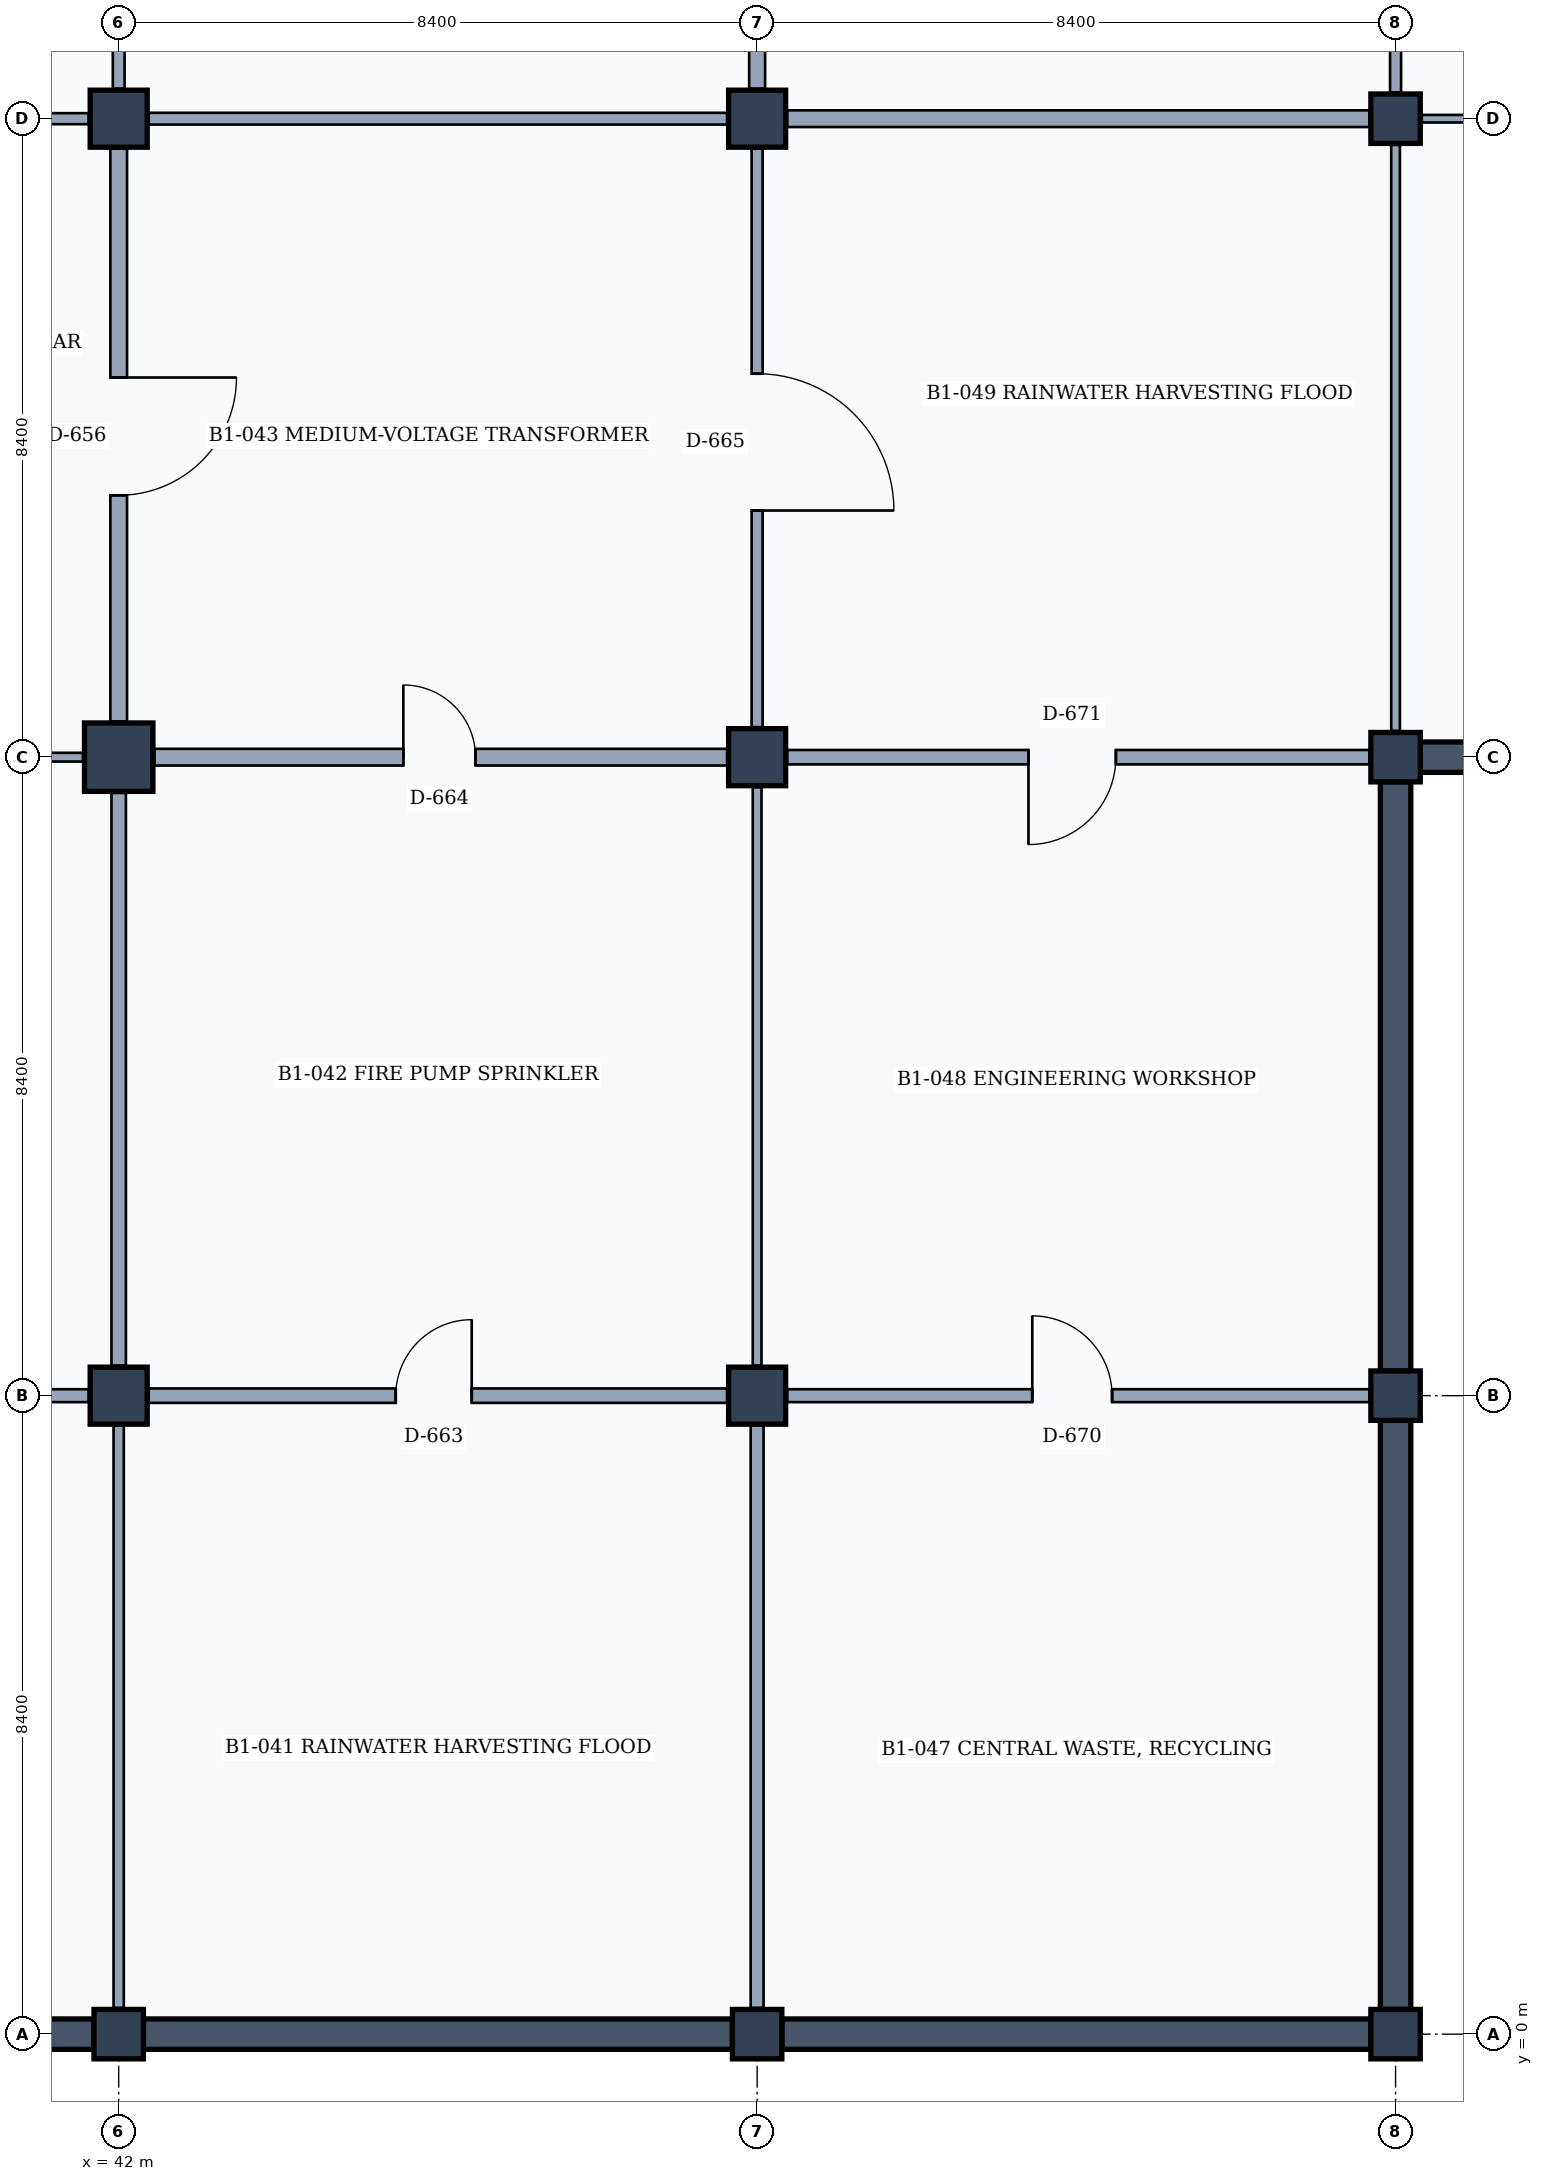
"""IFC4 building model, lengths in metres.
Left out: names, types, materials, properties, quantities, classifications, styles, units other than length and angle.
Written with IfcOpenShell. Run it as: python <this file> out.ifc"""

import sys

from ifc_helpers import new_model, si_unit, direction, frame, frame_2d, origin, origin_2d, place, context, subcontext, project, spatial, rectangle, extrude, element, fill, save


model = new_model("IFC4")
c1 = context("Model", 3, precision=1e-05, world=origin(), true_north=direction((0.0, 1.0)))
c2 = subcontext(c1, "Body", "Model", "MODEL_VIEW")
j1 = project(units=[si_unit("LENGTHUNIT", "METRE"), si_unit("PLANEANGLEUNIT", "RADIAN")], contexts=[c1])
p1 = place(None, origin())
s1 = spatial("IfcSite", under=j1, at=p1, CompositionType="ELEMENT")
p2 = place(p1, origin())
s2 = spatial("IfcBuilding", under=s1, at=p2, CompositionType="ELEMENT")
p3 = place(p2, frame((0.0, 0.0, -4.2)))
s3 = spatial("IfcBuildingStorey", under=s2, at=p3, CompositionType="ELEMENT", Elevation=-4.2)
p4 = place(p3, frame((42.0, 0.0, 0.0), z_axis=(0.0, 0.0, 1.0), x_axis=(1.0, 0.0, 0.0)))
e1 = element("IfcColumn", 1, at=p4, inside=s3, PredefinedType="COLUMN", context=c2, shape_type="SweptSolid", body=[
    extrude(rectangle(XDim=0.65, YDim=0.65, at=origin_2d()), origin(), (0.0, 0.0, 1.0), 4.2),
])
p5 = place(p3, frame((42.0, 8.4, 0.0), z_axis=(0.0, 0.0, 1.0), x_axis=(1.0, 0.0, 0.0)))
e2 = element("IfcColumn", 2, at=p5, inside=s3, PredefinedType="COLUMN", context=c2, shape_type="SweptSolid", body=[
    extrude(rectangle(XDim=0.75, YDim=0.75, at=origin_2d()), origin(), (0.0, 0.0, 1.0), 4.2),
])
p6 = place(p3, frame((42.0, 16.8, 0.0), z_axis=(0.0, 0.0, 1.0), x_axis=(1.0, 0.0, 0.0)))
e3 = element("IfcColumn", 3, at=p6, inside=s3, PredefinedType="COLUMN", context=c2, shape_type="SweptSolid", body=[
    extrude(rectangle(XDim=0.9, YDim=0.9, at=origin_2d()), origin(), (0.0, 0.0, 1.0), 4.2),
])
p7 = place(p3, frame((42.0, 25.2, 0.0), z_axis=(0.0, 0.0, 1.0), x_axis=(1.0, 0.0, 0.0)))
e4 = element("IfcColumn", 4, at=p7, inside=s3, PredefinedType="COLUMN", context=c2, shape_type="SweptSolid", body=[
    extrude(rectangle(XDim=0.75, YDim=0.75, at=origin_2d()), origin(), (0.0, 0.0, 1.0), 4.2),
])
p8 = place(p3, frame((50.4, 0.0, 0.0), z_axis=(0.0, 0.0, 1.0), x_axis=(1.0, 0.0, 0.0)))
e5 = element("IfcColumn", 5, at=p8, inside=s3, PredefinedType="COLUMN", context=c2, shape_type="SweptSolid", body=[
    extrude(rectangle(XDim=0.65, YDim=0.65, at=origin_2d()), origin(), (0.0, 0.0, 1.0), 4.2),
])
for number, where, z_axis, x_axis in (
    (6, (50.4, 8.4, 0.0), (0.0, 0.0, 1.0), (1.0, 0.0, 0.0)),
    (7, (50.4, 16.8, 0.0), (0.0, 0.0, 1.0), (1.0, 0.0, 0.0)),
    (8, (50.4, 25.2, 0.0), (0.0, 0.0, 1.0), (1.0, 0.0, 0.0)),
):
    element("IfcColumn", number, at=place(p3, frame(where, z_axis=z_axis, x_axis=x_axis)), inside=s3, PredefinedType="COLUMN", context=c2, shape_type="SweptSolid", body=[
        extrude(rectangle(XDim=0.75, YDim=0.75, at=origin_2d()), origin(), (0.0, 0.0, 1.0), 4.2),
    ])
for number, where, z_axis, x_axis in (
    (9, (58.8, 0.0, 0.0), (0.0, 0.0, 1.0), (1.0, 0.0, 0.0)),
    (10, (58.8, 8.4, 0.0), (0.0, 0.0, 1.0), (1.0, 0.0, 0.0)),
    (11, (58.8, 16.8, 0.0), (0.0, 0.0, 1.0), (1.0, 0.0, 0.0)),
    (12, (58.8, 25.2, 0.0), (0.0, 0.0, 1.0), (1.0, 0.0, 0.0)),
):
    element("IfcColumn", number, at=place(p3, frame(where, z_axis=z_axis, x_axis=x_axis)), inside=s3, PredefinedType="COLUMN", context=c2, shape_type="SweptSolid", body=[
        extrude(rectangle(XDim=0.65, YDim=0.65, at=origin_2d()), origin(), (0.0, 0.0, 1.0), 4.2),
    ])
for number, where, z_axis, x_axis in (
    (13, (41.675, 0.0, 0.0), (0.0, 0.0, 1.0), (-1.0, 0.0, 0.0)),
    (14, (50.075, 0.0, 0.0), (0.0, 0.0, 1.0), (-1.0, 0.0, 0.0)),
    (15, (58.475, 0.0, 0.0), (0.0, 0.0, 1.0), (-1.0, 0.0, 0.0)),
    (16, (58.8, 8.075, 0.0), (0.0, 0.0, 1.0), (0.0, -1.0, 0.0)),
    (17, (58.8, 16.475, 0.0), (0.0, 0.0, 1.0), (0.0, -1.0, 0.0)),
):
    element("IfcWall", number, at=place(p3, frame(where, z_axis=z_axis, x_axis=x_axis)), inside=s3, PredefinedType="STANDARD", context=c2, shape_type="SweptSolid", body=[
        extrude(rectangle(XDim=7.75, YDim=0.4, at=frame_2d((3.875, 0.0))), origin(), (0.0, 0.0, 1.0), 3.88),
    ])
p9 = place(p3, frame((66.925, 16.8, 0.0), z_axis=(0.0, 0.0, 1.0), x_axis=(-1.0, 0.0, 0.0)))
e18 = element("IfcWall", 18, at=p9, inside=s3, PredefinedType="STANDARD", context=c2, shape_type="SweptSolid", body=[
    extrude(rectangle(XDim=7.8, YDim=0.4, at=frame_2d((3.9, 0.0))), origin(), (0.0, 0.0, 1.0), 3.88),
])
p10 = place(p3, frame((42.0, 0.345, 0.0), z_axis=(0.0, 0.0, 1.0), x_axis=(0.0, 1.0, 0.0)))
e19 = element("IfcWall", 19, at=p10, inside=s3, PredefinedType="PARTITIONING", context=c2, shape_type="SweptSolid", body=[
    extrude(rectangle(XDim=7.66, YDim=0.135, at=frame_2d((3.83, 0.0))), origin(), (0.0, 0.0, 1.0), 3.25),
])
p11 = place(p3, frame((33.995, 8.4, 0.0), z_axis=(0.0, 0.0, 1.0), x_axis=(1.0, 0.0, 0.0)))
e20 = element("IfcWall", 20, at=p11, inside=s3, PredefinedType="PARTITIONING", context=c2, shape_type="SweptSolid", body=[
    extrude(rectangle(XDim=7.61, YDim=0.17, at=frame_2d((3.805, 0.0))), origin(), (0.0, 0.0, 1.0), 3.05),
])
p12 = place(p11, frame((3.175, 0.0, 0.0)))
e21 = element("IfcOpeningElement", 21, at=p12, cuts=e20, PredefinedType="OPENING", context=c2, shape_type="SweptSolid", body=[
    extrude(rectangle(XDim=1.15, YDim=2.25, at=frame_2d((0.575, 1.125))), frame((0.0, 0.095, 0.0), z_axis=(0.0, -1.0, 0.0), x_axis=(1.0, 0.0, 0.0)), (0.0, 0.0, 1.0), 0.19),
])
p13 = place(p3, frame((42.0, 8.795, 0.0), z_axis=(0.0, 0.0, 1.0), x_axis=(0.0, 1.0, 0.0)))
e22 = element("IfcWall", 22, at=p13, inside=s3, PredefinedType="PARTITIONING", context=c2, shape_type="SweptSolid", body=[
    extrude(rectangle(XDim=7.535, YDim=0.19, at=frame_2d((3.768, 0.0))), origin(), (0.0, 0.0, 1.0), 3.25),
])
p14 = place(p3, frame((33.995, 16.8, 0.0), z_axis=(0.0, 0.0, 1.0), x_axis=(1.0, 0.0, 0.0)))
e23 = element("IfcWall", 23, at=p14, inside=s3, PredefinedType="PARTITIONING", context=c2, shape_type="SweptSolid", body=[
    extrude(rectangle(XDim=7.535, YDim=0.115, at=frame_2d((3.768, 0.0))), origin(), (0.0, 0.0, 1.0), 3.05),
])
p15 = place(p14, frame((3.1, 0.0, 0.0)))
e24 = element("IfcOpeningElement", 24, at=p15, cuts=e23, PredefinedType="OPENING", context=c2, shape_type="SweptSolid", body=[
    extrude(rectangle(XDim=1.3, YDim=2.2, at=frame_2d((0.65, 1.1))), frame((0.0, 0.067, 0.0), z_axis=(0.0, -1.0, 0.0), x_axis=(1.0, 0.0, 0.0)), (0.0, 0.0, 1.0), 0.135),
])
p16 = place(p3, frame((42.0, 17.27, 0.0), z_axis=(0.0, 0.0, 1.0), x_axis=(0.0, 1.0, 0.0)))
e25 = element("IfcWall", 25, at=p16, inside=s3, PredefinedType="PARTITIONING", context=c2, shape_type="SweptSolid", body=[
    extrude(rectangle(XDim=7.535, YDim=0.22, at=frame_2d((3.768, 0.0))), origin(), (0.0, 0.0, 1.0), 3.25),
])
p17 = place(p16, frame((2.975, 0.0, 0.0)))
e26 = element("IfcOpeningElement", 26, at=p17, cuts=e25, PredefinedType="OPENING", context=c2, shape_type="SweptSolid", body=[
    extrude(rectangle(XDim=1.55, YDim=2.35, at=frame_2d((0.775, 1.175))), frame((0.0, 0.12, 0.0), z_axis=(0.0, -1.0, 0.0), x_axis=(1.0, 0.0, 0.0)), (0.0, 0.0, 1.0), 0.24),
])
p18 = place(p3, frame((33.995, 25.2, 0.0), z_axis=(0.0, 0.0, 1.0), x_axis=(1.0, 0.0, 0.0)))
e27 = element("IfcWall", 27, at=p18, inside=s3, PredefinedType="PARTITIONING", context=c2, shape_type="SweptSolid", body=[
    extrude(rectangle(XDim=7.61, YDim=0.145, at=frame_2d((3.805, 0.0))), origin(), (0.0, 0.0, 1.0), 3.05),
])
p19 = place(p3, frame((42.0, 25.595, 0.0), z_axis=(0.0, 0.0, 1.0), x_axis=(0.0, 1.0, 0.0)))
e28 = element("IfcWall", 28, at=p19, inside=s3, PredefinedType="PARTITIONING", context=c2, shape_type="SweptSolid", body=[
    extrude(rectangle(XDim=7.535, YDim=0.155, at=frame_2d((3.768, 0.0))), origin(), (0.0, 0.0, 1.0), 3.25),
])
p20 = place(p19, frame((2.9, 0.0, 0.0)))
e29 = element("IfcOpeningElement", 29, at=p20, cuts=e28, PredefinedType="OPENING", context=c2, shape_type="SweptSolid", body=[
    extrude(rectangle(XDim=1.7, YDim=2.3, at=frame_2d((0.85, 1.15))), frame((0.0, 0.087, 0.0), z_axis=(0.0, -1.0, 0.0), x_axis=(1.0, 0.0, 0.0)), (0.0, 0.0, 1.0), 0.175),
])
p21 = place(p3, frame((50.4, 0.345, 0.0), z_axis=(0.0, 0.0, 1.0), x_axis=(0.0, 1.0, 0.0)))
e30 = element("IfcWall", 30, at=p21, inside=s3, PredefinedType="PARTITIONING", context=c2, shape_type="SweptSolid", body=[
    extrude(rectangle(XDim=7.66, YDim=0.17, at=frame_2d((3.83, 0.0))), origin(), (0.0, 0.0, 1.0), 3.25),
])
p22 = place(p3, frame((42.395, 8.4, 0.0), z_axis=(0.0, 0.0, 1.0), x_axis=(1.0, 0.0, 0.0)))
e31 = element("IfcWall", 31, at=p22, inside=s3, PredefinedType="PARTITIONING", context=c2, shape_type="SweptSolid", body=[
    extrude(rectangle(XDim=7.61, YDim=0.19, at=frame_2d((3.805, 0.0))), origin(), (0.0, 0.0, 1.0), 3.05),
])
p23 = place(p22, frame((3.25, 0.0, 0.0)))
e32 = element("IfcOpeningElement", 32, at=p23, cuts=e31, PredefinedType="OPENING", context=c2, shape_type="SweptSolid", body=[
    extrude(rectangle(XDim=1.0, YDim=2.15, at=frame_2d((0.5, 1.075))), frame((0.0, 0.105, 0.0), z_axis=(0.0, -1.0, 0.0), x_axis=(1.0, 0.0, 0.0)), (0.0, 0.0, 1.0), 0.21),
])
p24 = place(p3, frame((50.4, 8.795, 0.0), z_axis=(0.0, 0.0, 1.0), x_axis=(0.0, 1.0, 0.0)))
e33 = element("IfcWall", 33, at=p24, inside=s3, PredefinedType="PARTITIONING", context=c2, shape_type="SweptSolid", body=[
    extrude(rectangle(XDim=7.61, YDim=0.115, at=frame_2d((3.805, 0.0))), origin(), (0.0, 0.0, 1.0), 3.25),
])
p25 = place(p3, frame((42.47, 16.8, 0.0), z_axis=(0.0, 0.0, 1.0), x_axis=(1.0, 0.0, 0.0)))
e34 = element("IfcWall", 34, at=p25, inside=s3, PredefinedType="PARTITIONING", context=c2, shape_type="SweptSolid", body=[
    extrude(rectangle(XDim=7.535, YDim=0.22, at=frame_2d((3.768, 0.0))), origin(), (0.0, 0.0, 1.0), 3.05),
])
p26 = place(p25, frame((3.275, 0.0, 0.0)))
e35 = element("IfcOpeningElement", 35, at=p26, cuts=e34, PredefinedType="OPENING", context=c2, shape_type="SweptSolid", body=[
    extrude(rectangle(XDim=0.95, YDim=2.15, at=frame_2d((0.475, 1.075))), frame((0.0, 0.12, 0.0), z_axis=(0.0, -1.0, 0.0), x_axis=(1.0, 0.0, 0.0)), (0.0, 0.0, 1.0), 0.24),
])
p27 = place(p3, frame((50.4, 17.195, 0.0), z_axis=(0.0, 0.0, 1.0), x_axis=(0.0, 1.0, 0.0)))
e36 = element("IfcWall", 36, at=p27, inside=s3, PredefinedType="PARTITIONING", context=c2, shape_type="SweptSolid", body=[
    extrude(rectangle(XDim=7.61, YDim=0.145, at=frame_2d((3.805, 0.0))), origin(), (0.0, 0.0, 1.0), 3.25),
])
p28 = place(p27, frame((2.85, 0.0, 0.0)))
e37 = element("IfcOpeningElement", 37, at=p28, cuts=e36, PredefinedType="OPENING", context=c2, shape_type="SweptSolid", body=[
    extrude(rectangle(XDim=1.8, YDim=2.3, at=frame_2d((0.9, 1.15))), frame((0.0, 0.083, 0.0), z_axis=(0.0, -1.0, 0.0), x_axis=(1.0, 0.0, 0.0)), (0.0, 0.0, 1.0), 0.165),
])
p29 = place(p3, frame((42.395, 25.2, 0.0), z_axis=(0.0, 0.0, 1.0), x_axis=(1.0, 0.0, 0.0)))
e38 = element("IfcWall", 38, at=p29, inside=s3, PredefinedType="PARTITIONING", context=c2, shape_type="SweptSolid", body=[
    extrude(rectangle(XDim=7.61, YDim=0.155, at=frame_2d((3.805, 0.0))), origin(), (0.0, 0.0, 1.0), 3.05),
])
p30 = place(p3, frame((50.4, 25.595, 0.0), z_axis=(0.0, 0.0, 1.0), x_axis=(0.0, 1.0, 0.0)))
e39 = element("IfcWall", 39, at=p30, inside=s3, PredefinedType="PARTITIONING", context=c2, shape_type="SweptSolid", body=[
    extrude(rectangle(XDim=7.61, YDim=0.21, at=frame_2d((3.805, 0.0))), origin(), (0.0, 0.0, 1.0), 3.25),
])
p31 = place(p3, frame((50.795, 8.4, 0.0), z_axis=(0.0, 0.0, 1.0), x_axis=(1.0, 0.0, 0.0)))
e40 = element("IfcWall", 40, at=p31, inside=s3, PredefinedType="PARTITIONING", context=c2, shape_type="SweptSolid", body=[
    extrude(rectangle(XDim=7.66, YDim=0.17, at=frame_2d((3.83, 0.0))), origin(), (0.0, 0.0, 1.0), 2.95),
])
p32 = place(p31, frame((3.225, 0.0, 0.0)))
e41 = element("IfcOpeningElement", 41, at=p32, cuts=e40, PredefinedType="OPENING", context=c2, shape_type="SweptSolid", body=[
    extrude(rectangle(XDim=1.05, YDim=2.2, at=frame_2d((0.525, 1.1))), frame((0.0, 0.095, 0.0), z_axis=(0.0, -1.0, 0.0), x_axis=(1.0, 0.0, 0.0)), (0.0, 0.0, 1.0), 0.19),
])
p33 = place(p3, frame((50.795, 16.8, 0.0), z_axis=(0.0, 0.0, 1.0), x_axis=(1.0, 0.0, 0.0)))
e42 = element("IfcWall", 42, at=p33, inside=s3, PredefinedType="PARTITIONING", context=c2, shape_type="SweptSolid", body=[
    extrude(rectangle(XDim=7.66, YDim=0.19, at=frame_2d((3.83, 0.0))), origin(), (0.0, 0.0, 1.0), 2.95),
])
p34 = place(p33, frame((3.175, 0.0, 0.0)))
e43 = element("IfcOpeningElement", 43, at=p34, cuts=e42, PredefinedType="OPENING", context=c2, shape_type="SweptSolid", body=[
    extrude(rectangle(XDim=1.15, YDim=2.25, at=frame_2d((0.575, 1.125))), frame((0.0, 0.105, 0.0), z_axis=(0.0, -1.0, 0.0), x_axis=(1.0, 0.0, 0.0)), (0.0, 0.0, 1.0), 0.21),
])
p35 = place(p3, frame((58.8, 17.145, 0.0), z_axis=(0.0, 0.0, 1.0), x_axis=(0.0, 1.0, 0.0)))
e44 = element("IfcWall", 44, at=p35, inside=s3, PredefinedType="PARTITIONING", context=c2, shape_type="SweptSolid", body=[
    extrude(rectangle(XDim=7.71, YDim=0.115, at=frame_2d((3.855, 0.0))), origin(), (0.0, 0.0, 1.0), 3.25),
])
p36 = place(p3, frame((50.795, 25.2, 0.0), z_axis=(0.0, 0.0, 1.0), x_axis=(1.0, 0.0, 0.0)))
e45 = element("IfcWall", 45, at=p36, inside=s3, PredefinedType="PARTITIONING", context=c2, shape_type="SweptSolid", body=[
    extrude(rectangle(XDim=7.66, YDim=0.22, at=frame_2d((3.83, 0.0))), origin(), (0.0, 0.0, 1.0), 2.95),
])
p37 = place(p3, frame((58.8, 25.545, 0.0), z_axis=(0.0, 0.0, 1.0), x_axis=(0.0, 1.0, 0.0)))
e46 = element("IfcWall", 46, at=p37, inside=s3, PredefinedType="PARTITIONING", context=c2, shape_type="SweptSolid", body=[
    extrude(rectangle(XDim=7.71, YDim=0.145, at=frame_2d((3.855, 0.0))), origin(), (0.0, 0.0, 1.0), 3.25),
])
p38 = place(p3, frame((59.145, 25.2, 0.0), z_axis=(0.0, 0.0, 1.0), x_axis=(1.0, 0.0, 0.0)))
e47 = element("IfcWall", 47, at=p38, inside=s3, PredefinedType="MOVABLE", context=c2, shape_type="SweptSolid", body=[
    extrude(rectangle(XDim=7.71, YDim=0.1, at=frame_2d((3.855, 0.0))), origin(), (0.0, 0.0, 1.0), 2.95),
])
p39 = place(p38, frame((3.125, 0.0, 0.0)))
e48 = element("IfcOpeningElement", 48, at=p39, cuts=e47, PredefinedType="OPENING", context=c2, shape_type="SweptSolid", body=[
    extrude(rectangle(XDim=1.25, YDim=2.3, at=frame_2d((0.625, 1.15))), frame((0.0, 0.06, 0.0), z_axis=(0.0, -1.0, 0.0), x_axis=(1.0, 0.0, 0.0)), (0.0, 0.0, 1.0), 0.12),
])
p40 = place(p17, frame((1.55, 0.0, 0.0), z_axis=(0.0, 0.0, 1.0), x_axis=(-1.0, 0.0, 0.0)))
e49 = element("IfcDoor", 49, at=p40, inside=s3, OperationType="SINGLE_SWING_LEFT", PredefinedType="DOOR", context=c2, shape_type="SweptSolid", body=[
    extrude(rectangle(XDim=1.55, YDim=2.35, at=frame_2d((0.775, 1.175))), frame((0.0, 0.025, 0.0), z_axis=(0.0, -1.0, 0.0), x_axis=(1.0, 0.0, 0.0)), (0.0, 0.0, 1.0), 0.05),
])
fill(e26, e49)
p41 = place(p23, origin())
e50 = element("IfcDoor", 50, at=p41, inside=s3, OperationType="SINGLE_SWING_RIGHT", PredefinedType="DOOR", context=c2, shape_type="SweptSolid", body=[
    extrude(rectangle(XDim=1.0, YDim=2.15, at=frame_2d((0.5, 1.075))), frame((0.0, 0.025, 0.0), z_axis=(0.0, -1.0, 0.0), x_axis=(1.0, 0.0, 0.0)), (0.0, 0.0, 1.0), 0.05),
])
fill(e32, e50)
p42 = place(p26, origin())
e51 = element("IfcDoor", 51, at=p42, inside=s3, OperationType="SINGLE_SWING_LEFT", PredefinedType="DOOR", context=c2, shape_type="SweptSolid", body=[
    extrude(rectangle(XDim=0.95, YDim=2.15, at=frame_2d((0.475, 1.075))), frame((0.0, 0.025, 0.0), z_axis=(0.0, -1.0, 0.0), x_axis=(1.0, 0.0, 0.0)), (0.0, 0.0, 1.0), 0.05),
])
fill(e35, e51)
p43 = place(p28, frame((1.8, 0.0, 0.0), z_axis=(0.0, 0.0, 1.0), x_axis=(-1.0, 0.0, 0.0)))
e52 = element("IfcDoor", 52, at=p43, inside=s3, OperationType="SINGLE_SWING_RIGHT", PredefinedType="DOOR", context=c2, shape_type="SweptSolid", body=[
    extrude(rectangle(XDim=1.8, YDim=2.3, at=frame_2d((0.9, 1.15))), frame((0.0, 0.025, 0.0), z_axis=(0.0, -1.0, 0.0), x_axis=(1.0, 0.0, 0.0)), (0.0, 0.0, 1.0), 0.05),
])
fill(e37, e52)
p44 = place(p32, origin())
e53 = element("IfcDoor", 53, at=p44, inside=s3, OperationType="SINGLE_SWING_LEFT", PredefinedType="DOOR", context=c2, shape_type="SweptSolid", body=[
    extrude(rectangle(XDim=1.05, YDim=2.2, at=frame_2d((0.525, 1.1))), frame((0.0, 0.025, 0.0), z_axis=(0.0, -1.0, 0.0), x_axis=(1.0, 0.0, 0.0)), (0.0, 0.0, 1.0), 0.05),
])
fill(e41, e53)
p45 = place(p34, frame((1.15, 0.0, 0.0), z_axis=(0.0, 0.0, 1.0), x_axis=(-1.0, 0.0, 0.0)))
e54 = element("IfcDoor", 54, at=p45, inside=s3, OperationType="SINGLE_SWING_RIGHT", PredefinedType="DOOR", context=c2, shape_type="SweptSolid", body=[
    extrude(rectangle(XDim=1.15, YDim=2.25, at=frame_2d((0.575, 1.125))), frame((0.0, 0.025, 0.0), z_axis=(0.0, -1.0, 0.0), x_axis=(1.0, 0.0, 0.0)), (0.0, 0.0, 1.0), 0.05),
])
fill(e43, e54)
save(model, sys.argv[1])
